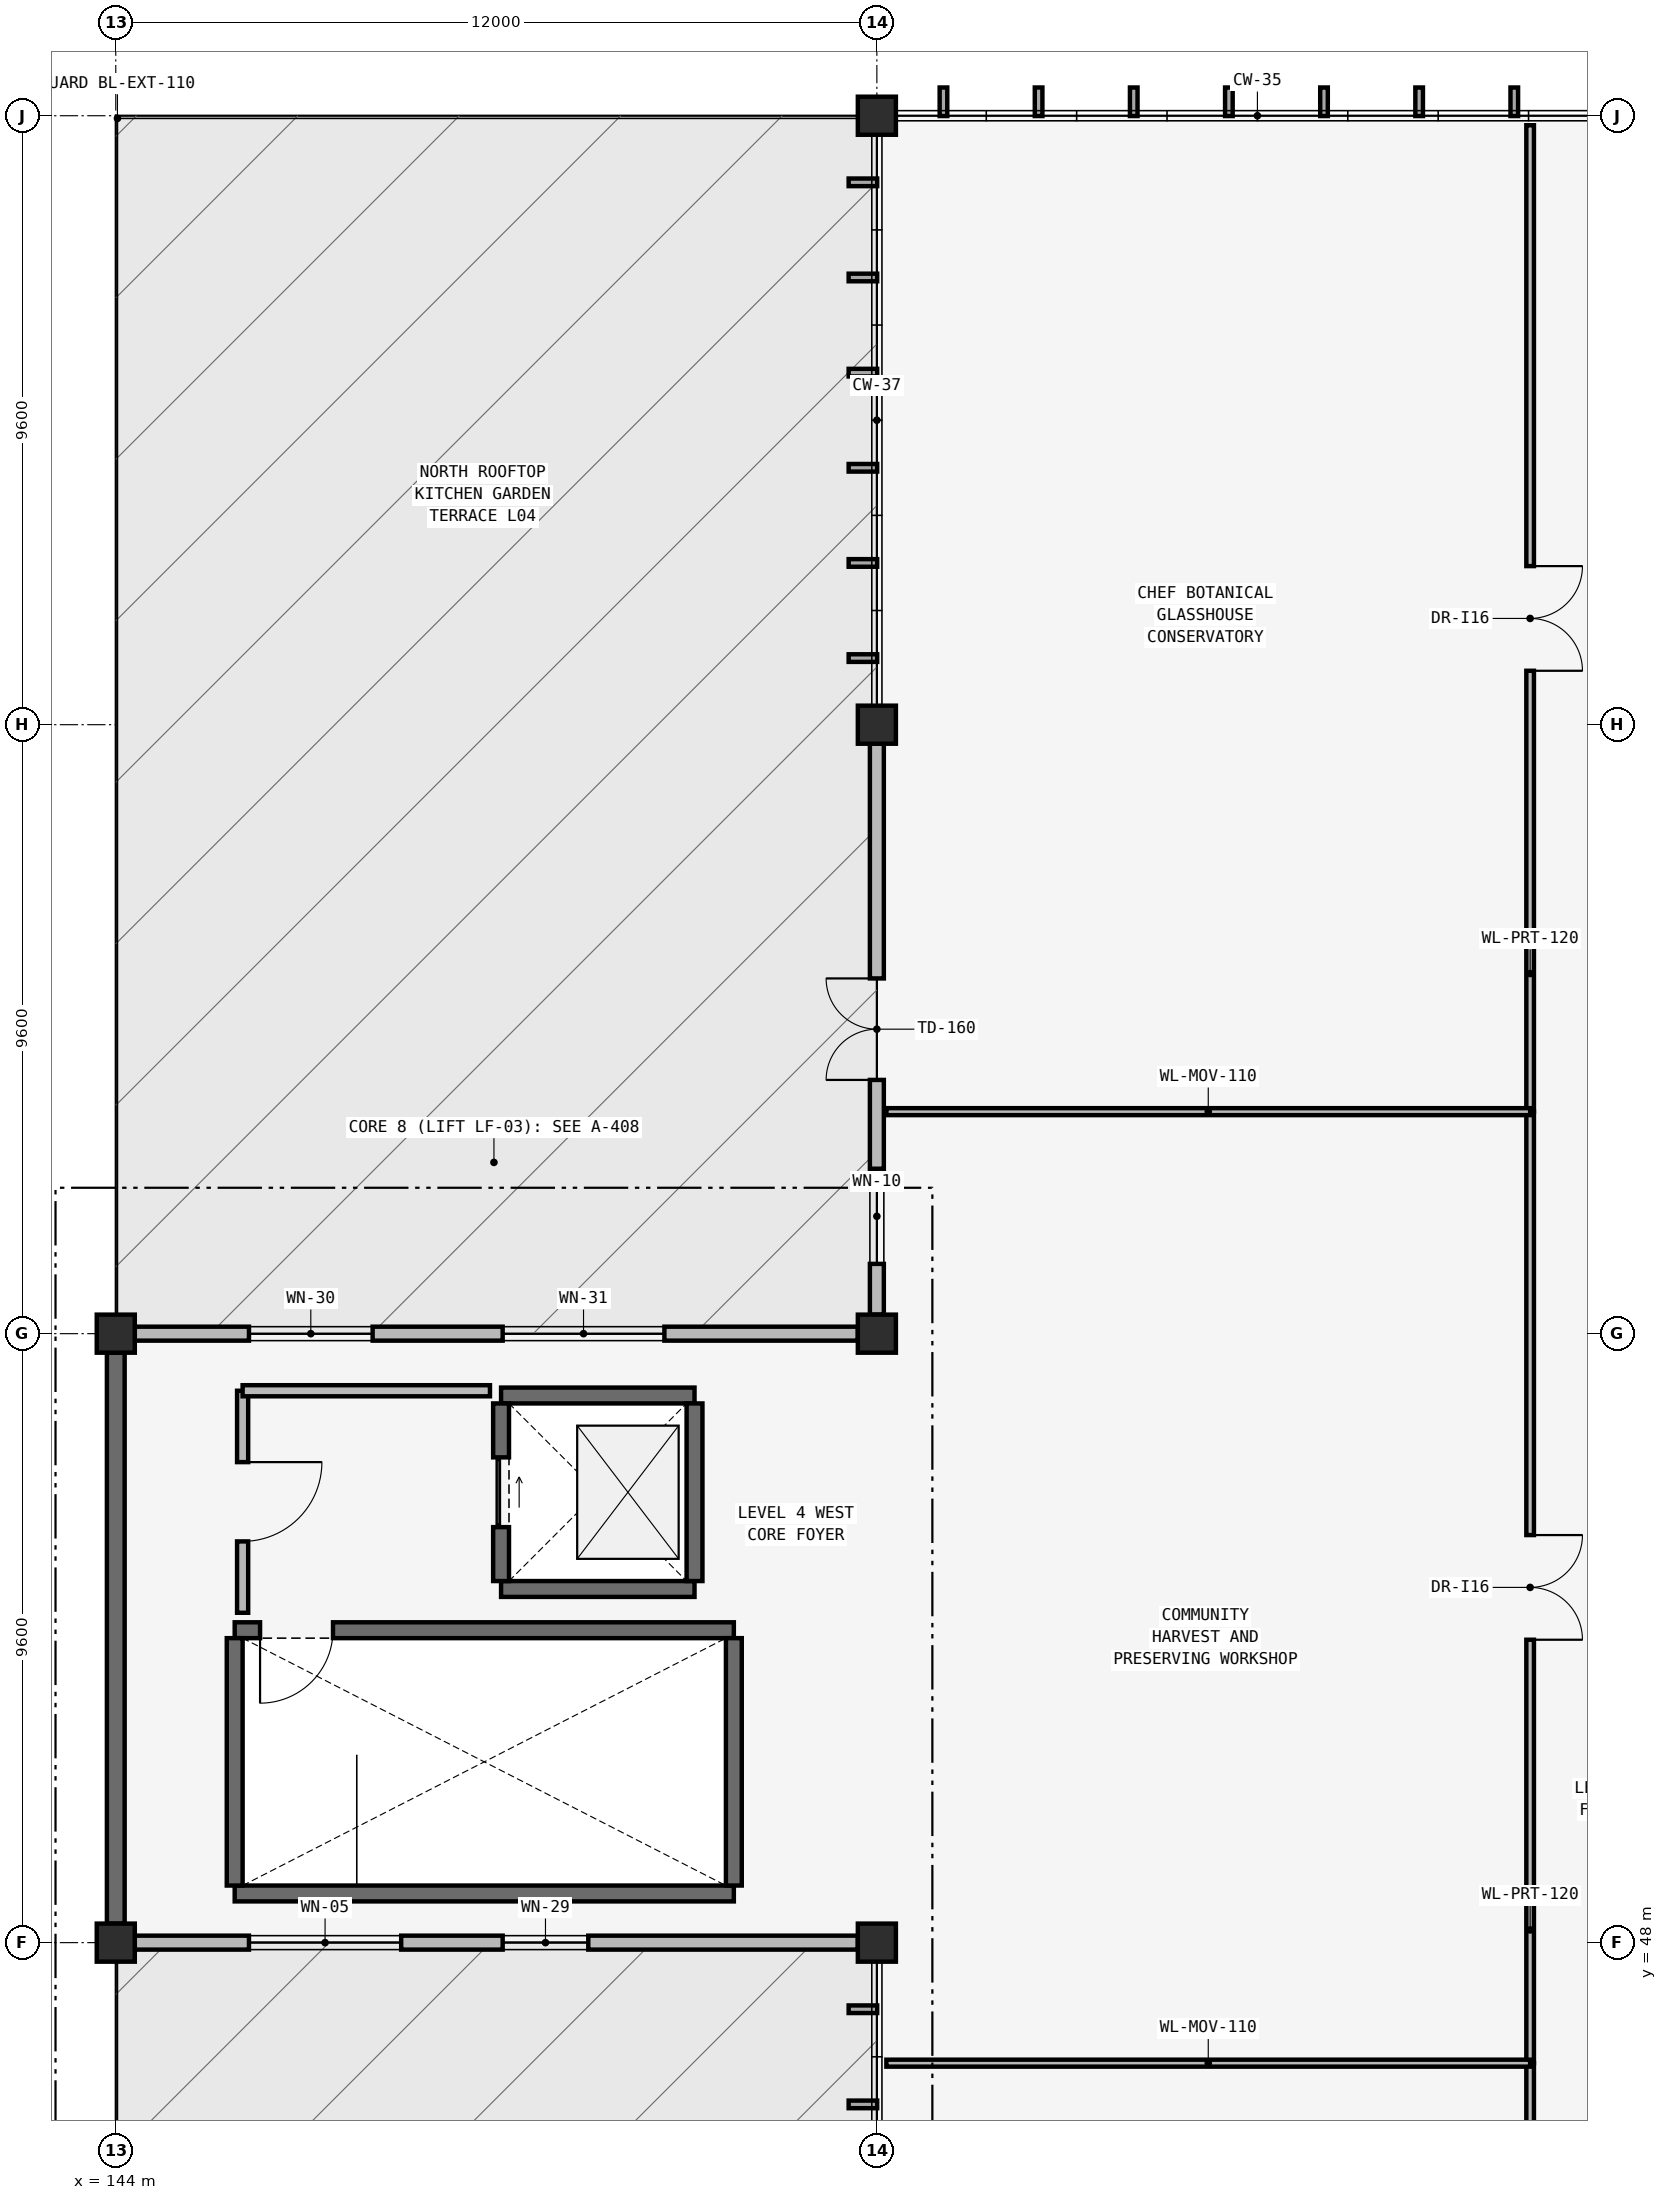
"""IFC4 building model, lengths in metres.
Left out: names, types, materials, properties, quantities, classifications, styles, units other than length and angle.
Written with IfcOpenShell. Run it as: python <this file> out.ifc"""

import sys

from ifc_helpers import new_model, si_unit, direction, frame, frame_2d, origin, origin_2d, place, context, subcontext, project, spatial, rectangle, extrude, element, fill, save


model = new_model("IFC4")
c1 = context("Model", 3, precision=1e-05, world=origin(), true_north=direction((0.0, 1.0)))
c2 = subcontext(c1, "Body", "Model", "MODEL_VIEW")
j1 = project(units=[si_unit("LENGTHUNIT", "METRE"), si_unit("PLANEANGLEUNIT", "RADIAN")], contexts=[c1])
p1 = place(None, origin())
s1 = spatial("IfcSite", under=j1, at=p1, CompositionType="ELEMENT")
p2 = place(p1, origin())
s2 = spatial("IfcBuilding", under=s1, at=p2, CompositionType="ELEMENT")
p3 = place(p2, frame((0.0, 0.0, 18.6)))
s3 = spatial("IfcBuildingStorey", under=s2, at=p3, CompositionType="ELEMENT", Elevation=18.6)
for number, where, z_axis, x_axis in (
    (1, (144.0, 48.0, 0.0), (0.0, 0.0, 1.0), (1.0, 0.0, 0.0)),
    (2, (144.0, 57.6, 0.0), (0.0, 0.0, 1.0), (1.0, 0.0, 0.0)),
    (3, (156.0, 48.0, 0.0), (0.0, 0.0, 1.0), (1.0, 0.0, 0.0)),
    (4, (156.0, 57.6, 0.0), (0.0, 0.0, 1.0), (1.0, 0.0, 0.0)),
    (5, (156.0, 67.2, 0.0), (0.0, 0.0, 1.0), (1.0, 0.0, 0.0)),
    (6, (156.0, 76.8, 0.0), (0.0, 0.0, 1.0), (1.0, 0.0, 0.0)),
):
    element("IfcColumn", number, at=place(p3, frame(where, z_axis=z_axis, x_axis=x_axis)), inside=s3, PredefinedType="COLUMN", context=c2, shape_type="SweptSolid", body=[
        extrude(rectangle(XDim=0.6, YDim=0.6, at=origin_2d()), origin(), (0.0, 0.0, 1.0), 4.2),
    ])
p4 = place(p3, frame((156.0, 57.9, 0.0), z_axis=(0.0, 0.0, 1.0), x_axis=(0.0, 1.0, 0.0)))
e7 = element("IfcWall", 7, at=p4, inside=s3, PredefinedType="SOLIDWALL", context=c2, shape_type="SweptSolid", body=[
    extrude(rectangle(XDim=9.0, YDim=0.22, at=frame_2d((4.5, 0.0))), origin(), (0.0, 0.0, 1.0), 3.206),
])
p5 = place(p4, frame((3.7, 0.0, 0.0)))
e8 = element("IfcOpeningElement", 8, at=p5, cuts=e7, PredefinedType="OPENING", context=c2, shape_type="SweptSolid", body=[
    extrude(rectangle(XDim=1.6, YDim=2.2, at=frame_2d((0.8, 1.1))), frame((0.0, 0.125, 0.0), z_axis=(0.0, -1.0, 0.0), x_axis=(1.0, 0.0, 0.0)), (0.0, 0.0, 1.0), 0.25),
])
p6 = place(p4, frame((0.8, 0.0, 0.8)))
e9 = element("IfcOpeningElement", 9, at=p6, cuts=e7, PredefinedType="OPENING", context=c2, shape_type="SweptSolid", body=[
    extrude(rectangle(XDim=1.5, YDim=2.1, at=frame_2d((0.75, 1.05))), frame((0.0, 0.125, 0.0), z_axis=(0.0, -1.0, 0.0), x_axis=(1.0, 0.0, 0.0)), (0.0, 0.0, 1.0), 0.25),
])
p7 = place(p3, frame((144.3, 48.0, 0.0), z_axis=(0.0, 0.0, 1.0), x_axis=(1.0, 0.0, 0.0)))
e10 = element("IfcWall", 10, at=p7, inside=s3, PredefinedType="SOLIDWALL", context=c2, shape_type="SweptSolid", body=[
    extrude(rectangle(XDim=11.4, YDim=0.22, at=frame_2d((5.7, 0.0))), origin(), (0.0, 0.0, 1.0), 3.206),
])
p8 = place(p7, frame((1.8, 0.0, 0.9)))
e11 = element("IfcOpeningElement", 11, at=p8, cuts=e10, PredefinedType="OPENING", context=c2, shape_type="SweptSolid", body=[
    extrude(rectangle(XDim=2.4, YDim=1.8, at=frame_2d((1.2, 0.9))), frame((0.0, 0.125, 0.0), z_axis=(0.0, -1.0, 0.0), x_axis=(1.0, 0.0, 0.0)), (0.0, 0.0, 1.0), 0.25),
])
p9 = place(p7, frame((5.8, 0.0, 0.95)))
e12 = element("IfcOpeningElement", 12, at=p9, cuts=e10, PredefinedType="OPENING", context=c2, shape_type="SweptSolid", body=[
    extrude(rectangle(XDim=1.35, YDim=1.65, at=frame_2d((0.675, 0.825))), frame((0.0, 0.125, 0.0), z_axis=(0.0, -1.0, 0.0), x_axis=(1.0, 0.0, 0.0)), (0.0, 0.0, 1.0), 0.25),
])
p10 = place(p3, frame((144.3, 57.6, 0.0), z_axis=(0.0, 0.0, 1.0), x_axis=(1.0, 0.0, 0.0)))
e13 = element("IfcWall", 13, at=p10, inside=s3, PredefinedType="SOLIDWALL", context=c2, shape_type="SweptSolid", body=[
    extrude(rectangle(XDim=11.4, YDim=0.22, at=frame_2d((5.7, 0.0))), origin(), (0.0, 0.0, 1.0), 3.206),
])
p11 = place(p10, frame((1.8, 0.0, 0.95)))
e14 = element("IfcOpeningElement", 14, at=p11, cuts=e13, PredefinedType="OPENING", context=c2, shape_type="SweptSolid", body=[
    extrude(rectangle(XDim=1.95, YDim=1.65, at=frame_2d((0.975, 0.825))), frame((0.0, 0.125, 0.0), z_axis=(0.0, -1.0, 0.0), x_axis=(1.0, 0.0, 0.0)), (0.0, 0.0, 1.0), 0.25),
])
p12 = place(p10, frame((5.8, 0.0, 0.95)))
e15 = element("IfcOpeningElement", 15, at=p12, cuts=e13, PredefinedType="OPENING", context=c2, shape_type="SweptSolid", body=[
    extrude(rectangle(XDim=2.55, YDim=1.65, at=frame_2d((1.275, 0.825))), frame((0.0, 0.125, 0.0), z_axis=(0.0, -1.0, 0.0), x_axis=(1.0, 0.0, 0.0)), (0.0, 0.0, 1.0), 0.25),
])
p13 = place(p3, frame((144.0, 48.3, 0.0), z_axis=(0.0, 0.0, 1.0), x_axis=(0.0, 1.0, 0.0)))
e16 = element("IfcWall", 16, at=p13, inside=s3, PredefinedType="SOLIDWALL", context=c2, shape_type="SweptSolid", body=[
    extrude(rectangle(XDim=9.0, YDim=0.28, at=frame_2d((4.5, 0.0))), origin(), (0.0, 0.0, 1.0), 3.95),
])
p14 = place(p3, frame((145.875, 48.775, 0.0), z_axis=(0.0, 0.0, 1.0), x_axis=(1.0, 0.0, 0.0)))
e17 = element("IfcWall", 17, at=p14, inside=s3, PredefinedType="SHEAR", context=c2, shape_type="SweptSolid", body=[
    extrude(rectangle(XDim=7.87, YDim=0.25, at=frame_2d((3.935, 0.0))), origin(), (0.0, 0.0, 1.0), 3.98),
])
p15 = place(p3, frame((145.875, 52.925, 0.0), z_axis=(0.0, 0.0, 1.0), x_axis=(1.0, 0.0, 0.0)))
e18 = element("IfcWall", 18, at=p15, inside=s3, PredefinedType="SHEAR", context=c2, shape_type="SweptSolid", body=[
    extrude(rectangle(XDim=7.87, YDim=0.25, at=frame_2d((3.935, 0.0))), origin(), (0.0, 0.0, 1.0), 3.98),
])
p16 = place(p15, frame((0.4, 0.0, 0.0)))
e19 = element("IfcOpeningElement", 19, at=p16, cuts=e18, PredefinedType="OPENING", context=c2, shape_type="SweptSolid", body=[
    extrude(rectangle(XDim=1.15, YDim=2.15, at=frame_2d((0.575, 1.075))), frame((0.0, 0.14, 0.0), z_axis=(0.0, -1.0, 0.0), x_axis=(1.0, 0.0, 0.0)), (0.0, 0.0, 1.0), 0.28),
])
for number, where, z_axis, x_axis in (
    (20, (145.875, 48.9, 0.0), (0.0, 0.0, 1.0), (0.0, 1.0, 0.0)),
    (21, (153.745, 48.9, 0.0), (0.0, 0.0, 1.0), (0.0, 1.0, 0.0)),
):
    element("IfcWall", number, at=place(p3, frame(where, z_axis=z_axis, x_axis=x_axis)), inside=s3, PredefinedType="SHEAR", context=c2, shape_type="SweptSolid", body=[
        extrude(rectangle(XDim=3.9, YDim=0.25, at=frame_2d((1.95, 0.0))), origin(), (0.0, 0.0, 1.0), 3.98),
    ])
for number, where, z_axis, x_axis in (
    (22, (150.075, 53.575, 0.0), (0.0, 0.0, 1.0), (1.0, 0.0, 0.0)),
    (23, (150.075, 56.625, 0.0), (0.0, 0.0, 1.0), (1.0, 0.0, 0.0)),
):
    element("IfcWall", number, at=place(p3, frame(where, z_axis=z_axis, x_axis=x_axis)), inside=s3, PredefinedType="SHEAR", context=c2, shape_type="SweptSolid", body=[
        extrude(rectangle(XDim=3.05, YDim=0.25, at=frame_2d((1.525, 0.0))), origin(), (0.0, 0.0, 1.0), 3.98),
    ])
p17 = place(p3, frame((153.125, 53.7, 0.0), z_axis=(0.0, 0.0, 1.0), x_axis=(0.0, 1.0, 0.0)))
e24 = element("IfcWall", 24, at=p17, inside=s3, PredefinedType="SHEAR", context=c2, shape_type="SweptSolid", body=[
    extrude(rectangle(XDim=2.8, YDim=0.25, at=frame_2d((1.4, 0.0))), origin(), (0.0, 0.0, 1.0), 3.98),
])
p18 = place(p3, frame((150.075, 53.7, 0.0), z_axis=(0.0, 0.0, 1.0), x_axis=(0.0, 1.0, 0.0)))
e25 = element("IfcWall", 25, at=p18, inside=s3, PredefinedType="SHEAR", context=c2, shape_type="SweptSolid", body=[
    extrude(rectangle(XDim=2.8, YDim=0.25, at=frame_2d((1.4, 0.0))), origin(), (0.0, 0.0, 1.0), 3.98),
])
p19 = place(p18, frame((0.85, 0.0, 0.0)))
e26 = element("IfcOpeningElement", 26, at=p19, cuts=e25, PredefinedType="OPENING", context=c2, shape_type="SweptSolid", body=[
    extrude(rectangle(XDim=1.1, YDim=2.15, at=frame_2d((0.55, 1.075))), frame((0.0, 0.14, 0.0), z_axis=(0.0, -1.0, 0.0), x_axis=(1.0, 0.0, 0.0)), (0.0, 0.0, 1.0), 0.28),
])
p20 = place(p3, frame((146.0, 53.2, 0.0), z_axis=(0.0, 0.0, 1.0), x_axis=(0.0, 1.0, 0.0)))
e27 = element("IfcWall", 27, at=p20, inside=s3, PredefinedType="PARTITIONING", context=c2, shape_type="SweptSolid", body=[
    extrude(rectangle(XDim=3.5, YDim=0.175, at=frame_2d((1.75, 0.0))), origin(), (0.0, 0.0, 1.0), 3.98),
])
p21 = place(p20, frame((1.125, 0.0, 0.0)))
e28 = element("IfcOpeningElement", 28, at=p21, cuts=e27, PredefinedType="OPENING", context=c2, shape_type="SweptSolid", body=[
    extrude(rectangle(XDim=1.25, YDim=2.2, at=frame_2d((0.625, 1.1))), frame((0.0, 0.103, 0.0), z_axis=(0.0, -1.0, 0.0), x_axis=(1.0, 0.0, 0.0)), (0.0, 0.0, 1.0), 0.205),
])
p22 = place(p3, frame((146.0, 56.7, 0.0), z_axis=(0.0, 0.0, 1.0), x_axis=(1.0, 0.0, 0.0)))
e29 = element("IfcWall", 29, at=p22, inside=s3, PredefinedType="PARTITIONING", context=c2, shape_type="SweptSolid", body=[
    extrude(rectangle(XDim=3.9, YDim=0.175, at=frame_2d((1.95, 0.0))), origin(), (0.0, 0.0, 1.0), 3.98),
])
p23 = place(p3, frame((166.3, 28.95, 0.0), z_axis=(0.0, 0.0, 1.0), x_axis=(0.0, 1.0, 0.0)))
e30 = element("IfcWall", 30, at=p23, inside=s3, PredefinedType="PARTITIONING", context=c2, shape_type="SweptSolid", body=[
    extrude(rectangle(XDim=17.15, YDim=0.12, at=frame_2d((8.575, 0.0))), origin(), (0.0, 0.0, 1.0), 3.98),
])
p24 = place(p23, frame((7.45, 0.0, 0.0)))
e31 = element("IfcOpeningElement", 31, at=p24, cuts=e30, PredefinedType="OPENING", context=c2, shape_type="SweptSolid", body=[
    extrude(rectangle(XDim=2.25, YDim=2.35, at=frame_2d((1.125, 1.175))), frame((0.0, 0.075, 0.0), z_axis=(0.0, -1.0, 0.0), x_axis=(1.0, 0.0, 0.0)), (0.0, 0.0, 1.0), 0.15),
])
p25 = place(p3, frame((166.3, 46.1, 0.0), z_axis=(0.0, 0.0, 1.0), x_axis=(0.0, 1.0, 0.0)))
e32 = element("IfcWall", 32, at=p25, inside=s3, PredefinedType="PARTITIONING", context=c2, shape_type="SweptSolid", body=[
    extrude(rectangle(XDim=15.0, YDim=0.12, at=frame_2d((7.5, 0.0))), origin(), (0.0, 0.0, 1.0), 3.98),
])
p26 = place(p25, frame((6.675, 0.0, 0.0)))
e33 = element("IfcOpeningElement", 33, at=p26, cuts=e32, PredefinedType="OPENING", context=c2, shape_type="SweptSolid", body=[
    extrude(rectangle(XDim=1.65, YDim=2.2, at=frame_2d((0.825, 1.1))), frame((0.0, 0.075, 0.0), z_axis=(0.0, -1.0, 0.0), x_axis=(1.0, 0.0, 0.0)), (0.0, 0.0, 1.0), 0.15),
])
p27 = place(p3, frame((166.3, 61.1, 0.0), z_axis=(0.0, 0.0, 1.0), x_axis=(0.0, 1.0, 0.0)))
e34 = element("IfcWall", 34, at=p27, inside=s3, PredefinedType="PARTITIONING", context=c2, shape_type="SweptSolid", body=[
    extrude(rectangle(XDim=15.55, YDim=0.12, at=frame_2d((7.775, 0.0))), origin(), (0.0, 0.0, 1.0), 3.98),
])
p28 = place(p27, frame((6.95, 0.0, 0.0)))
e35 = element("IfcOpeningElement", 35, at=p28, cuts=e34, PredefinedType="OPENING", context=c2, shape_type="SweptSolid", body=[
    extrude(rectangle(XDim=1.65, YDim=2.2, at=frame_2d((0.825, 1.1))), frame((0.0, 0.075, 0.0), z_axis=(0.0, -1.0, 0.0), x_axis=(1.0, 0.0, 0.0)), (0.0, 0.0, 1.0), 0.15),
])
for number, where, z_axis, x_axis in (
    (36, (156.15, 46.1, 0.0), (0.0, 0.0, 1.0), (1.0, 0.0, 0.0)),
    (37, (156.15, 61.1, 0.0), (0.0, 0.0, 1.0), (1.0, 0.0, 0.0)),
):
    element("IfcWall", number, at=place(p3, frame(where, z_axis=z_axis, x_axis=x_axis)), inside=s3, PredefinedType="MOVABLE", context=c2, shape_type="SweptSolid", body=[
        extrude(rectangle(XDim=10.15, YDim=0.11, at=frame_2d((5.075, 0.0))), origin(), (0.0, 0.0, 1.0), 3.98),
    ])
p29 = place(p5, origin())
e38 = element("IfcDoor", 38, at=p29, inside=s3, OperationType="DOUBLE_DOOR_SINGLE_SWING", PredefinedType="DOOR", context=c2, shape_type="SweptSolid", body=[
    extrude(rectangle(XDim=1.6, YDim=2.2, at=frame_2d((0.8, 1.1))), frame((0.0, 0.025, 0.0), z_axis=(0.0, -1.0, 0.0), x_axis=(1.0, 0.0, 0.0)), (0.0, 0.0, 1.0), 0.05),
])
fill(e8, e38)
p30 = place(p6, origin())
e39 = element("IfcWindow", 39, at=p30, inside=s3, PartitioningType="SINGLE_PANEL", PredefinedType="WINDOW", context=c2, shape_type="SweptSolid", body=[
    extrude(rectangle(XDim=1.5, YDim=2.1, at=frame_2d((0.75, 1.05))), frame((0.0, 0.03, 0.0), z_axis=(0.0, -1.0, 0.0), x_axis=(1.0, 0.0, 0.0)), (0.0, 0.0, 1.0), 0.06),
])
fill(e9, e39)
p31 = place(p8, origin())
e40 = element("IfcWindow", 40, at=p31, inside=s3, PartitioningType="SINGLE_PANEL", PredefinedType="WINDOW", context=c2, shape_type="SweptSolid", body=[
    extrude(rectangle(XDim=2.4, YDim=1.8, at=frame_2d((1.2, 0.9))), frame((0.0, 0.03, 0.0), z_axis=(0.0, -1.0, 0.0), x_axis=(1.0, 0.0, 0.0)), (0.0, 0.0, 1.0), 0.06),
])
fill(e11, e40)
p32 = place(p9, origin())
e41 = element("IfcWindow", 41, at=p32, inside=s3, PartitioningType="SINGLE_PANEL", PredefinedType="WINDOW", context=c2, shape_type="SweptSolid", body=[
    extrude(rectangle(XDim=1.35, YDim=1.65, at=frame_2d((0.675, 0.825))), frame((0.0, 0.03, 0.0), z_axis=(0.0, -1.0, 0.0), x_axis=(1.0, 0.0, 0.0)), (0.0, 0.0, 1.0), 0.06),
])
fill(e12, e41)
p33 = place(p11, origin())
e42 = element("IfcWindow", 42, at=p33, inside=s3, PartitioningType="SINGLE_PANEL", PredefinedType="WINDOW", context=c2, shape_type="SweptSolid", body=[
    extrude(rectangle(XDim=1.95, YDim=1.65, at=frame_2d((0.975, 0.825))), frame((0.0, 0.03, 0.0), z_axis=(0.0, -1.0, 0.0), x_axis=(1.0, 0.0, 0.0)), (0.0, 0.0, 1.0), 0.06),
])
fill(e14, e42)
p34 = place(p12, origin())
e43 = element("IfcWindow", 43, at=p34, inside=s3, PartitioningType="SINGLE_PANEL", PredefinedType="WINDOW", context=c2, shape_type="SweptSolid", body=[
    extrude(rectangle(XDim=2.55, YDim=1.65, at=frame_2d((1.275, 0.825))), frame((0.0, 0.03, 0.0), z_axis=(0.0, -1.0, 0.0), x_axis=(1.0, 0.0, 0.0)), (0.0, 0.0, 1.0), 0.06),
])
fill(e15, e43)
p35 = place(p16, frame((1.15, 0.0, 0.0), z_axis=(0.0, 0.0, 1.0), x_axis=(-1.0, 0.0, 0.0)))
e44 = element("IfcDoor", 44, at=p35, inside=s3, OperationType="SINGLE_SWING_LEFT", PredefinedType="DOOR", context=c2, shape_type="SweptSolid", body=[
    extrude(rectangle(XDim=1.15, YDim=2.15, at=frame_2d((0.575, 1.075))), frame((0.0, 0.025, 0.0), z_axis=(0.0, -1.0, 0.0), x_axis=(1.0, 0.0, 0.0)), (0.0, 0.0, 1.0), 0.05),
])
fill(e19, e44)
p36 = place(p19, origin())
e45 = element("IfcDoor", 45, at=p36, inside=s3, OperationType="SLIDING_TO_LEFT", PredefinedType="DOOR", context=c2, shape_type="SweptSolid", body=[
    extrude(rectangle(XDim=1.1, YDim=2.15, at=frame_2d((0.55, 1.075))), frame((0.0, 0.025, 0.0), z_axis=(0.0, -1.0, 0.0), x_axis=(1.0, 0.0, 0.0)), (0.0, 0.0, 1.0), 0.05),
])
fill(e26, e45)
p37 = place(p21, frame((1.25, 0.0, 0.0), z_axis=(0.0, 0.0, 1.0), x_axis=(-1.0, 0.0, 0.0)))
e46 = element("IfcDoor", 46, at=p37, inside=s3, OperationType="SINGLE_SWING_RIGHT", PredefinedType="DOOR", context=c2, shape_type="SweptSolid", body=[
    extrude(rectangle(XDim=1.25, YDim=2.2, at=frame_2d((0.625, 1.1))), frame((0.0, 0.025, 0.0), z_axis=(0.0, -1.0, 0.0), x_axis=(1.0, 0.0, 0.0)), (0.0, 0.0, 1.0), 0.05),
])
fill(e28, e46)
p38 = place(p26, origin())
e47 = element("IfcDoor", 47, at=p38, inside=s3, OperationType="DOUBLE_DOOR_SINGLE_SWING", PredefinedType="DOOR", context=c2, shape_type="SweptSolid", body=[
    extrude(rectangle(XDim=1.65, YDim=2.2, at=frame_2d((0.825, 1.1))), frame((0.0, 0.025, 0.0), z_axis=(0.0, -1.0, 0.0), x_axis=(1.0, 0.0, 0.0)), (0.0, 0.0, 1.0), 0.05),
])
fill(e33, e47)
p39 = place(p28, origin())
e48 = element("IfcDoor", 48, at=p39, inside=s3, OperationType="DOUBLE_DOOR_SINGLE_SWING", PredefinedType="DOOR", context=c2, shape_type="SweptSolid", body=[
    extrude(rectangle(XDim=1.65, YDim=2.2, at=frame_2d((0.825, 1.1))), frame((0.0, 0.025, 0.0), z_axis=(0.0, -1.0, 0.0), x_axis=(1.0, 0.0, 0.0)), (0.0, 0.0, 1.0), 0.05),
])
fill(e35, e48)
save(model, sys.argv[1])
